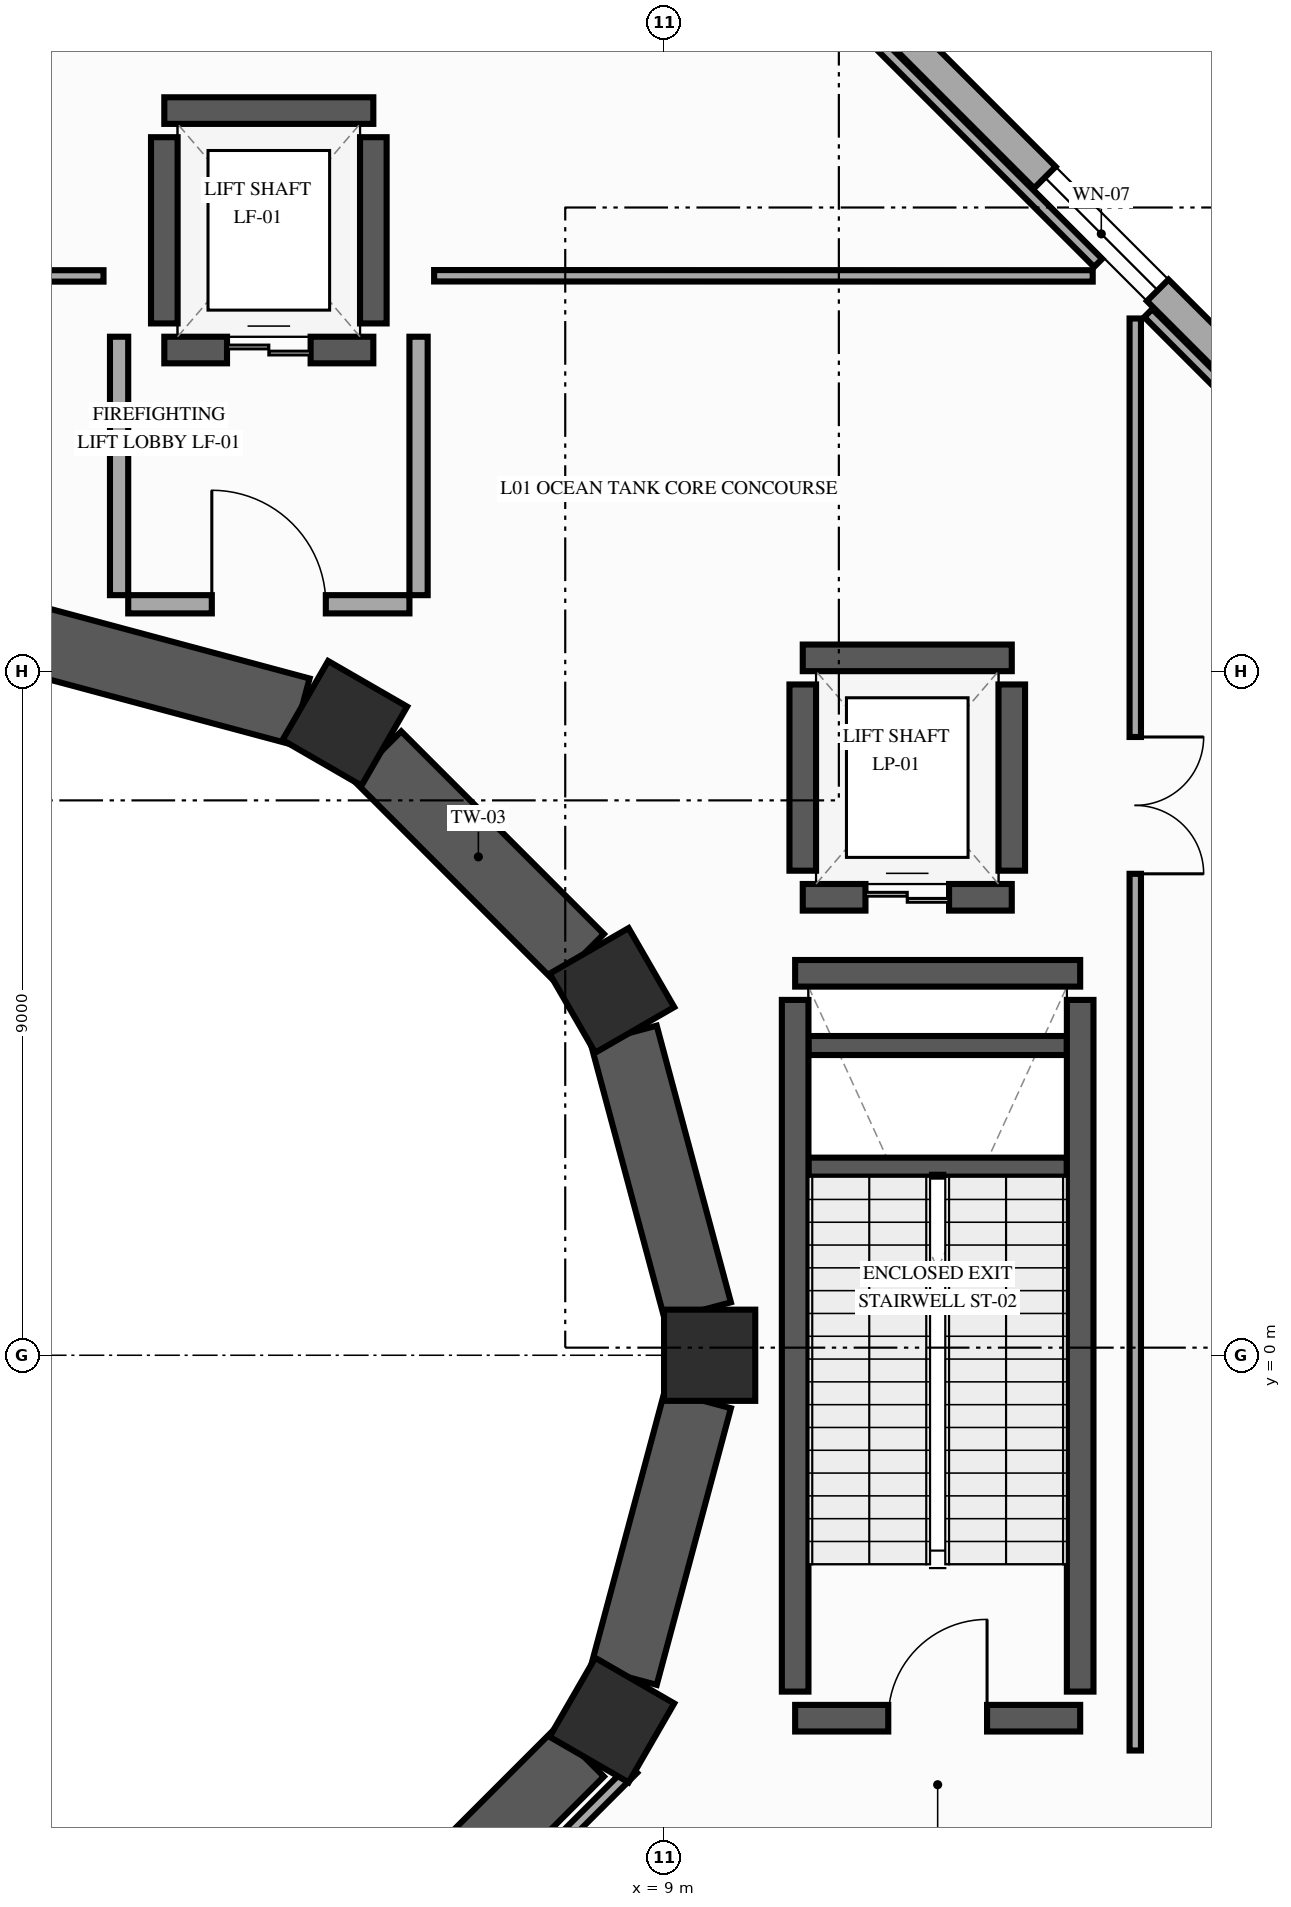
"""IFC4 building model, lengths in metres.
Left out: names, types, materials, properties, quantities, classifications, styles, units other than length and angle.
Written with IfcOpenShell. Run it as: python <this file> out.ifc"""

import sys

from ifc_helpers import new_model, si_unit, direction, frame, frame_2d, origin, origin_2d, place, context, subcontext, project, spatial, rectangle, extrude, element, fill, save


model = new_model("IFC4")
c1 = context("Model", 3, precision=1e-05, world=origin(), true_north=direction((0.0, 1.0)))
c2 = subcontext(c1, "Body", "Model", "MODEL_VIEW")
j1 = project(units=[si_unit("LENGTHUNIT", "METRE"), si_unit("PLANEANGLEUNIT", "RADIAN")], contexts=[c1])
p1 = place(None, origin())
s1 = spatial("IfcSite", under=j1, at=p1, CompositionType="ELEMENT")
p2 = place(p1, origin())
s2 = spatial("IfcBuilding", under=s1, at=p2, CompositionType="ELEMENT")
p3 = place(p2, frame((0.0, 0.0, 5.4)))
s3 = spatial("IfcBuildingStorey", under=s2, at=p3, CompositionType="ELEMENT", Elevation=5.4)
for number, where, z_axis, x_axis in (
    (1, (9.6, 0.0, 0.0), (0.0, 0.0, 1.0), (1.0, 0.0, 0.0)),
    (2, (8.314, 4.8, 0.0), (0.0, 0.0, 1.0), (0.866, 0.5, 0.0)),
    (3, (4.8, 8.314, 0.0), (0.0, 0.0, 1.0), (0.5, 0.866, 0.0)),
    (4, (8.314, -4.8, 0.0), (0.0, 0.0, 1.0), (0.866, -0.5, 0.0)),
):
    element("IfcColumn", number, at=place(p3, frame(where, z_axis=z_axis, x_axis=x_axis)), inside=s3, PredefinedType="COLUMN", context=c2, shape_type="SweptSolid", body=[
        extrude(rectangle(XDim=1.2, YDim=1.2, at=origin_2d()), origin(), (0.0, 0.0, 1.0), 5.4),
    ])
p4 = place(p3, frame((9.445, 0.58, 0.0), z_axis=(0.0, 0.0, 1.0), x_axis=(-0.259009169026, 0.965874862682, 0.0)))
e5 = element("IfcWall", 5, at=p4, inside=s3, PredefinedType="SHEAR", context=c2, shape_type="SweptSolid", body=[
    extrude(rectangle(XDim=3.769, YDim=0.9, at=frame_2d((1.884, 0.0))), origin(), (0.0, 0.0, 1.0), 5.14),
])
p5 = place(p3, frame((7.89, 5.224, 0.0), z_axis=(0.0, 0.0, 1.0), x_axis=(-0.707106781187, 0.707106781187, 0.0)))
e6 = element("IfcWall", 6, at=p5, inside=s3, PredefinedType="SHEAR", context=c2, shape_type="SweptSolid", body=[
    extrude(rectangle(XDim=3.77, YDim=0.9, at=frame_2d((1.885, 0.0))), origin(), (0.0, 0.0, 1.0), 5.14),
])
p6 = place(p3, frame((4.22, 8.469, 0.0), z_axis=(0.0, 0.0, 1.0), x_axis=(-0.965874862682, 0.259009169026, 0.0)))
e7 = element("IfcWall", 7, at=p6, inside=s3, PredefinedType="SHEAR", context=c2, shape_type="SweptSolid", body=[
    extrude(rectangle(XDim=3.769, YDim=0.9, at=frame_2d((1.884, 0.0))), origin(), (0.0, 0.0, 1.0), 5.14),
])
p7 = place(p3, frame((5.224, -7.89, 0.0), z_axis=(0.0, 0.0, 1.0), x_axis=(0.707106781187, 0.707106781187, 0.0)))
e8 = element("IfcWall", 8, at=p7, inside=s3, PredefinedType="SHEAR", context=c2, shape_type="SweptSolid", body=[
    extrude(rectangle(XDim=3.77, YDim=0.9, at=frame_2d((1.885, 0.0))), origin(), (0.0, 0.0, 1.0), 5.14),
])
p8 = place(p3, frame((8.469, -4.22, 0.0), z_axis=(0.0, 0.0, 1.0), x_axis=(0.259009169026, 0.965874862682, 0.0)))
e9 = element("IfcWall", 9, at=p8, inside=s3, PredefinedType="SHEAR", context=c2, shape_type="SweptSolid", body=[
    extrude(rectangle(XDim=3.769, YDim=0.9, at=frame_2d((1.884, 0.0))), origin(), (0.0, 0.0, 1.0), 5.14),
])
p9 = place(p3, frame((11.291, 18.215, 0.0), z_axis=(0.0, 0.0, 1.0), x_axis=(0.707106781187, -0.707106781187, 0.0)))
e10 = element("IfcWall", 10, at=p9, inside=s3, PredefinedType="SOLIDWALL", context=c2, shape_type="SweptSolid", body=[
    extrude(rectangle(XDim=9.792, YDim=0.4, at=frame_2d((4.896, 0.0))), origin(), (0.0, 0.0, 1.0), 4.275),
])
p10 = place(p9, frame((3.846, 0.0, 0.9)))
e11 = element("IfcOpeningElement", 11, at=p10, cuts=e10, PredefinedType="OPENING", context=c2, shape_type="SweptSolid", body=[
    extrude(rectangle(XDim=2.1, YDim=2.6, at=frame_2d((1.05, 1.3))), frame((0.0, 0.21, 0.0), z_axis=(0.0, -1.0, 0.0), x_axis=(1.0, 0.0, 0.0)), (0.0, 0.0, 1.0), 0.42),
])
for number, where, z_axis, x_axis in (
    (12, (10.9, 2.475, 0.0), (0.0, 0.0, 1.0), (1.0, 0.0, 0.0)),
    (13, (10.9, 4.075, 0.0), (0.0, 0.0, 1.0), (1.0, 0.0, 0.0)),
):
    element("IfcWall", number, at=place(p3, frame(where, z_axis=z_axis, x_axis=x_axis)), inside=s3, PredefinedType="SHEAR", context=c2, shape_type="SweptSolid", body=[
        extrude(rectangle(XDim=3.4, YDim=0.25, at=frame_2d((1.7, 0.0))), origin(), (0.0, 0.0, 1.0), 2.5),
    ])
p11 = place(p3, frame((10.725, -4.775, 0.0), z_axis=(0.0, 0.0, 1.0), x_axis=(1.0, 0.0, 0.0)))
e14 = element("IfcWall", 14, at=p11, inside=s3, PredefinedType="SHEAR", context=c2, shape_type="SweptSolid", body=[
    extrude(rectangle(XDim=3.75, YDim=0.35, at=frame_2d((1.875, 0.0))), origin(), (0.0, 0.0, 1.0), 5.15),
])
p12 = place(p11, frame((1.225, 0.0, 0.0)))
e15 = element("IfcOpeningElement", 15, at=p12, cuts=e14, PredefinedType="OPENING", context=c2, shape_type="SweptSolid", body=[
    extrude(rectangle(XDim=1.3, YDim=2.2, at=frame_2d((0.65, 1.1))), frame((0.0, 0.185, 0.0), z_axis=(0.0, -1.0, 0.0), x_axis=(1.0, 0.0, 0.0)), (0.0, 0.0, 1.0), 0.37),
])
p13 = place(p3, frame((10.725, 5.025, 0.0), z_axis=(0.0, 0.0, 1.0), x_axis=(1.0, 0.0, 0.0)))
e16 = element("IfcWall", 16, at=p13, inside=s3, PredefinedType="SHEAR", context=c2, shape_type="SweptSolid", body=[
    extrude(rectangle(XDim=3.75, YDim=0.35, at=frame_2d((1.875, 0.0))), origin(), (0.0, 0.0, 1.0), 5.15),
])
for number, where, z_axis, x_axis in (
    (17, (10.725, -4.425, 0.0), (0.0, 0.0, 1.0), (0.0, 1.0, 0.0)),
    (18, (14.475, -4.425, 0.0), (0.0, 0.0, 1.0), (0.0, 1.0, 0.0)),
):
    element("IfcWall", number, at=place(p3, frame(where, z_axis=z_axis, x_axis=x_axis)), inside=s3, PredefinedType="SHEAR", context=c2, shape_type="SweptSolid", body=[
        extrude(rectangle(XDim=9.1, YDim=0.35, at=frame_2d((4.55, 0.0))), origin(), (0.0, 0.0, 1.0), 5.15),
    ])
p14 = place(p3, frame((2.425, 13.225, 0.0), z_axis=(0.0, 0.0, 1.0), x_axis=(1.0, 0.0, 0.0)))
e19 = element("IfcWall", 19, at=p14, inside=s3, PredefinedType="SHEAR", context=c2, shape_type="SweptSolid", body=[
    extrude(rectangle(XDim=2.75, YDim=0.35, at=frame_2d((1.375, 0.0))), origin(), (0.0, 0.0, 1.0), 5.15),
])
p15 = place(p14, frame((0.825, 0.0, 0.0)))
e20 = element("IfcOpeningElement", 20, at=p15, cuts=e19, PredefinedType="OPENING", context=c2, shape_type="SweptSolid", body=[
    extrude(rectangle(XDim=1.1, YDim=2.2, at=frame_2d((0.55, 1.1))), frame((0.0, 0.185, 0.0), z_axis=(0.0, -1.0, 0.0), x_axis=(1.0, 0.0, 0.0)), (0.0, 0.0, 1.0), 0.37),
])
p16 = place(p3, frame((5.175, 16.375, 0.0), z_axis=(0.0, 0.0, 1.0), x_axis=(-1.0, 0.0, 0.0)))
e21 = element("IfcWall", 21, at=p16, inside=s3, PredefinedType="SHEAR", context=c2, shape_type="SweptSolid", body=[
    extrude(rectangle(XDim=2.75, YDim=0.35, at=frame_2d((1.375, 0.0))), origin(), (0.0, 0.0, 1.0), 5.15),
])
for number, where, z_axis, x_axis in (
    (22, (2.425, 13.575, 0.0), (0.0, 0.0, 1.0), (0.0, 1.0, 0.0)),
    (23, (5.175, 13.575, 0.0), (0.0, 0.0, 1.0), (0.0, 1.0, 0.0)),
):
    element("IfcWall", number, at=place(p3, frame(where, z_axis=z_axis, x_axis=x_axis)), inside=s3, PredefinedType="SHEAR", context=c2, shape_type="SweptSolid", body=[
        extrude(rectangle(XDim=2.45, YDim=0.35, at=frame_2d((1.225, 0.0))), origin(), (0.0, 0.0, 1.0), 5.15),
    ])
p17 = place(p3, frame((1.95, 9.88, 0.0), z_axis=(0.0, 0.0, 1.0), x_axis=(1.0, 0.0, 0.0)))
e24 = element("IfcWall", 24, at=p17, inside=s3, PredefinedType="PARTITIONING", context=c2, shape_type="SweptSolid", body=[
    extrude(rectangle(XDim=3.7, YDim=0.24, at=frame_2d((1.85, 0.0))), origin(), (0.0, 0.0, 1.0), 4.525),
])
p18 = place(p17, frame((1.1, 0.0, 0.0)))
e25 = element("IfcOpeningElement", 25, at=p18, cuts=e24, PredefinedType="OPENING", context=c2, shape_type="SweptSolid", body=[
    extrude(rectangle(XDim=1.5, YDim=2.2, at=frame_2d((0.75, 1.1))), frame((0.0, 0.13, 0.0), z_axis=(0.0, -1.0, 0.0), x_axis=(1.0, 0.0, 0.0)), (0.0, 0.0, 1.0), 0.26),
])
p19 = place(p3, frame((1.83, 10.0, 0.0), z_axis=(0.0, 0.0, 1.0), x_axis=(0.0, 1.0, 0.0)))
e26 = element("IfcWall", 26, at=p19, inside=s3, PredefinedType="PARTITIONING", context=c2, shape_type="SweptSolid", body=[
    extrude(rectangle(XDim=3.4, YDim=0.24, at=frame_2d((1.7, 0.0))), origin(), (0.0, 0.0, 1.0), 5.1),
])
p20 = place(p3, frame((5.77, 10.0, 0.0), z_axis=(0.0, 0.0, 1.0), x_axis=(0.0, 1.0, 0.0)))
e27 = element("IfcWall", 27, at=p20, inside=s3, PredefinedType="PARTITIONING", context=c2, shape_type="SweptSolid", body=[
    extrude(rectangle(XDim=3.4, YDim=0.24, at=frame_2d((1.7, 0.0))), origin(), (0.0, 0.0, 1.0), 4.525),
])
p21 = place(p3, frame((10.825, 6.025, 0.0), z_axis=(0.0, 0.0, 1.0), x_axis=(1.0, 0.0, 0.0)))
e28 = element("IfcWall", 28, at=p21, inside=s3, PredefinedType="SHEAR", context=c2, shape_type="SweptSolid", body=[
    extrude(rectangle(XDim=2.75, YDim=0.35, at=frame_2d((1.375, 0.0))), origin(), (0.0, 0.0, 1.0), 5.15),
])
p22 = place(p21, frame((0.825, 0.0, 0.0)))
e29 = element("IfcOpeningElement", 29, at=p22, cuts=e28, PredefinedType="OPENING", context=c2, shape_type="SweptSolid", body=[
    extrude(rectangle(XDim=1.1, YDim=2.2, at=frame_2d((0.55, 1.1))), frame((0.0, 0.185, 0.0), z_axis=(0.0, -1.0, 0.0), x_axis=(1.0, 0.0, 0.0)), (0.0, 0.0, 1.0), 0.37),
])
p23 = place(p3, frame((13.575, 9.175, 0.0), z_axis=(0.0, 0.0, 1.0), x_axis=(-1.0, 0.0, 0.0)))
e30 = element("IfcWall", 30, at=p23, inside=s3, PredefinedType="SHEAR", context=c2, shape_type="SweptSolid", body=[
    extrude(rectangle(XDim=2.75, YDim=0.35, at=frame_2d((1.375, 0.0))), origin(), (0.0, 0.0, 1.0), 5.15),
])
for number, where, z_axis, x_axis in (
    (31, (10.825, 6.375, 0.0), (0.0, 0.0, 1.0), (0.0, 1.0, 0.0)),
    (32, (13.575, 6.375, 0.0), (0.0, 0.0, 1.0), (0.0, 1.0, 0.0)),
):
    element("IfcWall", number, at=place(p3, frame(where, z_axis=z_axis, x_axis=x_axis)), inside=s3, PredefinedType="SHEAR", context=c2, shape_type="SweptSolid", body=[
        extrude(rectangle(XDim=2.45, YDim=0.35, at=frame_2d((1.225, 0.0))), origin(), (0.0, 0.0, 1.0), 5.15),
    ])
p24 = place(p3, frame((17.946, 11.135, 0.0), z_axis=(0.0, 0.0, 1.0), x_axis=(-0.706972707094, 0.707240829862, 0.0)))
e33 = element("IfcWall", 33, at=p24, inside=s3, PredefinedType="PARTITIONING", context=c2, shape_type="SweptSolid", body=[
    extrude(rectangle(XDim=3.642, YDim=0.15, at=frame_2d((1.821, 0.0))), origin(), (0.0, 0.0, 1.0), 4.275),
])
p25 = place(p3, frame((15.2, 13.64, 0.0), z_axis=(0.0, 0.0, 1.0), x_axis=(0.0, -1.0, 0.0)))
e34 = element("IfcWall", 34, at=p25, inside=s3, PredefinedType="PARTITIONING", context=c2, shape_type="SweptSolid", body=[
    extrude(rectangle(XDim=18.84, YDim=0.15, at=frame_2d((9.42, 0.0))), origin(), (0.0, 0.0, 1.0), 4.275),
])
p26 = place(p25, frame((5.506, 0.0, 0.0)))
e35 = element("IfcOpeningElement", 35, at=p26, cuts=e34, PredefinedType="OPENING", context=c2, shape_type="SweptSolid", body=[
    extrude(rectangle(XDim=1.8, YDim=2.3, at=frame_2d((0.9, 1.15))), frame((0.0, 0.085, 0.0), z_axis=(0.0, -1.0, 0.0), x_axis=(1.0, 0.0, 0.0)), (0.0, 0.0, 1.0), 0.17),
])
p27 = place(p3, frame((8.593, -5.44, 0.0), z_axis=(0.0, 0.0, 1.0), x_axis=(-0.707106781187, -0.707106781187, 0.0)))
e36 = element("IfcWall", 36, at=p27, inside=s3, PredefinedType="PARTITIONING", context=c2, shape_type="SweptSolid", body=[
    extrude(rectangle(XDim=4.459, YDim=0.15, at=frame_2d((2.229, 0.0))), origin(), (0.0, 0.0, 1.0), 4.525),
])
p28 = place(p3, frame((-14.64, 14.2, 0.0), z_axis=(0.0, 0.0, 1.0), x_axis=(1.0, 0.0, 0.0)))
e37 = element("IfcWall", 37, at=p28, inside=s3, PredefinedType="PARTITIONING", context=c2, shape_type="SweptSolid", body=[
    extrude(rectangle(XDim=16.265, YDim=0.15, at=frame_2d((8.132, 0.0))), origin(), (0.0, 0.0, 1.0), 4.275),
])
p29 = place(p28, frame((7.232, 0.0, 0.0)))
e38 = element("IfcOpeningElement", 38, at=p29, cuts=e37, PredefinedType="OPENING", context=c2, shape_type="SweptSolid", body=[
    extrude(rectangle(XDim=1.8, YDim=2.3, at=frame_2d((0.9, 1.15))), frame((0.0, 0.085, 0.0), z_axis=(0.0, -1.0, 0.0), x_axis=(1.0, 0.0, 0.0)), (0.0, 0.0, 1.0), 0.17),
])
p30 = place(p3, frame((5.975, 14.202, 0.0), z_axis=(0.0, 0.0, 1.0), x_axis=(0.999999974595, -0.000225409253, 0.0)))
e39 = element("IfcWall", 39, at=p30, inside=s3, PredefinedType="PARTITIONING", context=c2, shape_type="SweptSolid", body=[
    extrude(rectangle(XDim=8.665, YDim=0.15, at=frame_2d((4.333, 0.0))), origin(), (0.0, 0.0, 1.0), 4.275),
])
p31 = place(p3, frame((14.711, 14.371, 0.0), z_axis=(0.0, 0.0, 1.0), x_axis=(-0.707203340899, 0.707010208287, 0.0)))
e40 = element("IfcWall", 40, at=p31, inside=s3, PredefinedType="PARTITIONING", context=c2, shape_type="SweptSolid", body=[
    extrude(rectangle(XDim=5.056, YDim=0.15, at=frame_2d((2.528, 0.0))), origin(), (0.0, 0.0, 1.0), 4.275),
])
p32 = place(p10, origin())
e41 = element("IfcWindow", 41, at=p32, inside=s3, PartitioningType="SINGLE_PANEL", PredefinedType="WINDOW", context=c2, shape_type="SweptSolid", body=[
    extrude(rectangle(XDim=2.1, YDim=2.6, at=frame_2d((1.05, 1.3))), frame((0.0, 0.03, 0.0), z_axis=(0.0, -1.0, 0.0), x_axis=(1.0, 0.0, 0.0)), (0.0, 0.0, 1.0), 0.06),
])
fill(e11, e41)
p33 = place(p12, origin())
e42 = element("IfcDoor", 42, at=p33, inside=s3, OperationType="SINGLE_SWING_RIGHT", PredefinedType="DOOR", context=c2, shape_type="SweptSolid", body=[
    extrude(rectangle(XDim=1.3, YDim=2.2, at=frame_2d((0.65, 1.1))), frame((0.0, 0.025, 0.0), z_axis=(0.0, -1.0, 0.0), x_axis=(1.0, 0.0, 0.0)), (0.0, 0.0, 1.0), 0.05),
])
fill(e15, e42)
p34 = place(p15, origin())
e43 = element("IfcDoor", 43, at=p34, inside=s3, OperationType="DOUBLE_DOOR_SLIDING", PredefinedType="DOOR", context=c2, shape_type="SweptSolid", body=[
    extrude(rectangle(XDim=1.1, YDim=2.2, at=frame_2d((0.55, 1.1))), frame((0.0, 0.025, 0.0), z_axis=(0.0, -1.0, 0.0), x_axis=(1.0, 0.0, 0.0)), (0.0, 0.0, 1.0), 0.05),
])
fill(e20, e43)
p35 = place(p18, origin())
e44 = element("IfcDoor", 44, at=p35, inside=s3, OperationType="SINGLE_SWING_LEFT", PredefinedType="DOOR", context=c2, shape_type="SweptSolid", body=[
    extrude(rectangle(XDim=1.5, YDim=2.2, at=frame_2d((0.75, 1.1))), frame((0.0, 0.025, 0.0), z_axis=(0.0, -1.0, 0.0), x_axis=(1.0, 0.0, 0.0)), (0.0, 0.0, 1.0), 0.05),
])
fill(e25, e44)
p36 = place(p22, origin())
e45 = element("IfcDoor", 45, at=p36, inside=s3, OperationType="DOUBLE_DOOR_SLIDING", PredefinedType="DOOR", context=c2, shape_type="SweptSolid", body=[
    extrude(rectangle(XDim=1.1, YDim=2.2, at=frame_2d((0.55, 1.1))), frame((0.0, 0.025, 0.0), z_axis=(0.0, -1.0, 0.0), x_axis=(1.0, 0.0, 0.0)), (0.0, 0.0, 1.0), 0.05),
])
fill(e29, e45)
p37 = place(p26, origin())
e46 = element("IfcDoor", 46, at=p37, inside=s3, OperationType="DOUBLE_DOOR_SINGLE_SWING", PredefinedType="DOOR", context=c2, shape_type="SweptSolid", body=[
    extrude(rectangle(XDim=1.8, YDim=2.3, at=frame_2d((0.9, 1.15))), frame((0.0, 0.025, 0.0), z_axis=(0.0, -1.0, 0.0), x_axis=(1.0, 0.0, 0.0)), (0.0, 0.0, 1.0), 0.05),
])
fill(e35, e46)
save(model, sys.argv[1])
